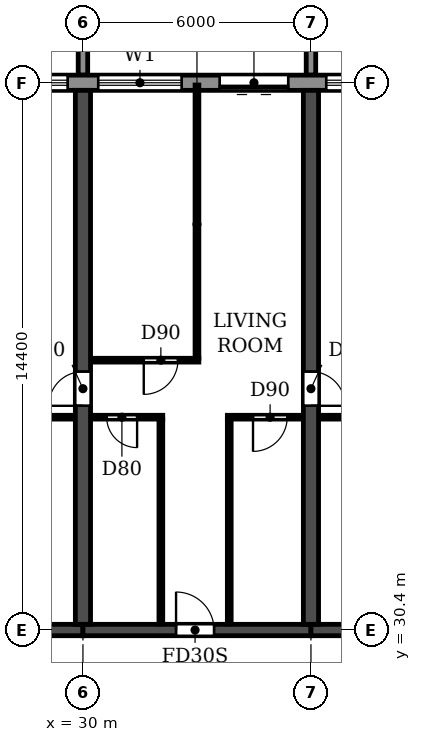
"""IFC4 building model, lengths in metres.
Left out: names, types, materials, properties, quantities, classifications, styles, units other than length and angle.
Written with IfcOpenShell. Run it as: python <this file> out.ifc"""

import sys

from ifc_helpers import new_model, si_unit, direction, frame, frame_2d, origin, place, context, subcontext, project, spatial, polyline, rectangle, outline, extrude, source, transform, mapped, element, fill, save


model = new_model("IFC4")
c1 = context("Model", 3, precision=1e-05, world=origin(), true_north=direction((0.0, 1.0)))
c2 = subcontext(c1, "Body", "Model", "MODEL_VIEW")
j1 = project(units=[si_unit("LENGTHUNIT", "METRE"), si_unit("PLANEANGLEUNIT", "RADIAN")], contexts=[c1])
p1 = place(None, origin())
s1 = spatial("IfcSite", under=j1, at=p1, CompositionType="ELEMENT")
p2 = place(p1, origin())
s2 = spatial("IfcBuilding", under=s1, at=p2, CompositionType="ELEMENT")
p3 = place(p2, frame((0.0, 0.0, 43.2)))
s3 = spatial("IfcBuildingStorey", under=s2, at=p3, CompositionType="ELEMENT", Elevation=43.2)
p4 = place(p3, frame((30.0, 30.55, 0.0), z_axis=(0.0, 0.0, 1.0), x_axis=(0.0, 1.0, 0.0)))
e1 = element("IfcWall", 1, at=p4, inside=s3, PredefinedType="SHEAR", context=c2, shape_type="SweptSolid", body=[
    extrude(rectangle(XDim=14.05, YDim=0.4, at=frame_2d((7.025, 0.0))), origin(), (0.0, 0.0, 1.0), 3.05),
])
p5 = place(p4, frame((5.75, 0.0, 0.0)))
e2 = element("IfcOpeningElement", 2, at=p5, cuts=e1, PredefinedType="OPENING", context=c2, shape_type="SweptSolid", body=[
    extrude(rectangle(XDim=0.9, YDim=2.1, at=frame_2d((0.45, 1.05))), frame((0.0, 0.21, 0.0), z_axis=(0.0, -1.0, 0.0), x_axis=(1.0, 0.0, 0.0)), (0.0, 0.0, 1.0), 0.42),
])
p6 = place(p3, frame((36.0, 30.55, 0.0), z_axis=(0.0, 0.0, 1.0), x_axis=(0.0, 1.0, 0.0)))
e3 = element("IfcWall", 3, at=p6, inside=s3, PredefinedType="SHEAR", context=c2, shape_type="SweptSolid", body=[
    extrude(rectangle(XDim=14.05, YDim=0.4, at=frame_2d((7.025, 0.0))), origin(), (0.0, 0.0, 1.0), 3.05),
])
p7 = place(p6, frame((5.75, 0.0, 0.0)))
e4 = element("IfcOpeningElement", 4, at=p7, cuts=e3, PredefinedType="OPENING", context=c2, shape_type="SweptSolid", body=[
    extrude(rectangle(XDim=0.9, YDim=2.1, at=frame_2d((0.45, 1.05))), frame((0.0, 0.21, 0.0), z_axis=(0.0, -1.0, 0.0), x_axis=(1.0, 0.0, 0.0)), (0.0, 0.0, 1.0), 0.42),
])
p8 = place(p3, frame((24.0, 30.4, 0.0), z_axis=(0.0, 0.0, 1.0), x_axis=(1.0, 0.0, 0.0)))
e5 = element("IfcWall", 5, at=p8, inside=s3, PredefinedType="SHEAR", context=c2, shape_type="SweptSolid", body=[
    extrude(rectangle(XDim=6.0, YDim=0.3, at=frame_2d((3.0, 0.0))), origin(), (0.0, 0.0, 1.0), 2.45),
])
p9 = place(p3, frame((30.0, 30.4, 0.0), z_axis=(0.0, 0.0, 1.0), x_axis=(1.0, 0.0, 0.0)))
e6 = element("IfcWall", 6, at=p9, inside=s3, PredefinedType="SHEAR", context=c2, shape_type="SweptSolid", body=[
    extrude(rectangle(XDim=6.0, YDim=0.3, at=frame_2d((3.0, 0.0))), origin(), (0.0, 0.0, 1.0), 2.45),
])
p10 = place(p9, frame((2.45, 0.0, 0.0)))
e7 = element("IfcOpeningElement", 7, at=p10, cuts=e6, PredefinedType="OPENING", context=c2, shape_type="SweptSolid", body=[
    extrude(rectangle(XDim=1.0, YDim=2.1, at=frame_2d((0.5, 1.05))), frame((0.0, 0.16, 0.0), z_axis=(0.0, -1.0, 0.0), x_axis=(1.0, 0.0, 0.0)), (0.0, 0.0, 1.0), 0.32),
])
p11 = place(p3, frame((36.0, 30.4, 0.0), z_axis=(0.0, 0.0, 1.0), x_axis=(1.0, 0.0, 0.0)))
e8 = element("IfcWall", 8, at=p11, inside=s3, PredefinedType="SHEAR", context=c2, shape_type="SweptSolid", body=[
    extrude(rectangle(XDim=6.0, YDim=0.3, at=frame_2d((3.0, 0.0))), origin(), (0.0, 0.0, 1.0), 2.45),
])
p12 = place(p3, frame((97.317, 44.8, 0.0), z_axis=(0.0, 0.0, 1.0), x_axis=(-1.0, 0.0, 0.0)))
e9 = element("IfcWall", 9, at=p12, inside=s3, PredefinedType="STANDARD", context=c2, shape_type="SweptSolid", body=[
    extrude(rectangle(XDim=92.634, YDim=0.4, at=frame_2d((46.317, 0.0))), origin(), (0.0, 0.0, 1.0), 3.05),
])
p13 = place(p12, frame((88.917, 0.0, 0.0)))
e10 = element("IfcOpeningElement", 10, at=p13, cuts=e9, PredefinedType="OPENING", context=c2, shape_type="SweptSolid", body=[
    extrude(rectangle(XDim=1.8, YDim=2.4, at=frame_2d((0.9, 1.2))), frame((0.0, 0.21, 0.0), z_axis=(0.0, -1.0, 0.0), x_axis=(1.0, 0.0, 0.0)), (0.0, 0.0, 1.0), 0.42),
])
p14 = place(p12, frame((85.717, 0.0, 0.9)))
e11 = element("IfcOpeningElement", 11, at=p14, cuts=e9, PredefinedType="OPENING", context=c2, shape_type="SweptSolid", body=[
    extrude(rectangle(XDim=2.2, YDim=1.5, at=frame_2d((1.1, 0.75))), frame((0.0, 0.21, 0.0), z_axis=(0.0, -1.0, 0.0), x_axis=(1.0, 0.0, 0.0)), (0.0, 0.0, 1.0), 0.42),
])
p15 = place(p12, frame((82.717, 0.0, 0.9)))
e12 = element("IfcOpeningElement", 12, at=p15, cuts=e9, PredefinedType="OPENING", context=c2, shape_type="SweptSolid", body=[
    extrude(rectangle(XDim=2.2, YDim=1.5, at=frame_2d((1.1, 0.75))), frame((0.0, 0.21, 0.0), z_axis=(0.0, -1.0, 0.0), x_axis=(1.0, 0.0, 0.0)), (0.0, 0.0, 1.0), 0.42),
])
p16 = place(p12, frame((79.717, 0.0, 0.9)))
e13 = element("IfcOpeningElement", 13, at=p16, cuts=e9, PredefinedType="OPENING", context=c2, shape_type="SweptSolid", body=[
    extrude(rectangle(XDim=2.2, YDim=1.5, at=frame_2d((1.1, 0.75))), frame((0.0, 0.21, 0.0), z_axis=(0.0, -1.0, 0.0), x_axis=(1.0, 0.0, 0.0)), (0.0, 0.0, 1.0), 0.42),
])
p17 = place(p12, frame((76.717, 0.0, 0.9)))
e14 = element("IfcOpeningElement", 14, at=p17, cuts=e9, PredefinedType="OPENING", context=c2, shape_type="SweptSolid", body=[
    extrude(rectangle(XDim=2.2, YDim=1.5, at=frame_2d((1.1, 0.75))), frame((0.0, 0.21, 0.0), z_axis=(0.0, -1.0, 0.0), x_axis=(1.0, 0.0, 0.0)), (0.0, 0.0, 1.0), 0.42),
])
p18 = place(p12, frame((73.917, 0.0, 0.0)))
e15 = element("IfcOpeningElement", 15, at=p18, cuts=e9, PredefinedType="OPENING", context=c2, shape_type="SweptSolid", body=[
    extrude(rectangle(XDim=1.8, YDim=2.4, at=frame_2d((0.9, 1.2))), frame((0.0, 0.21, 0.0), z_axis=(0.0, -1.0, 0.0), x_axis=(1.0, 0.0, 0.0)), (0.0, 0.0, 1.0), 0.42),
])
p19 = place(p12, frame((70.717, 0.0, 0.9)))
e16 = element("IfcOpeningElement", 16, at=p19, cuts=e9, PredefinedType="OPENING", context=c2, shape_type="SweptSolid", body=[
    extrude(rectangle(XDim=2.2, YDim=1.5, at=frame_2d((1.1, 0.75))), frame((0.0, 0.21, 0.0), z_axis=(0.0, -1.0, 0.0), x_axis=(1.0, 0.0, 0.0)), (0.0, 0.0, 1.0), 0.42),
])
p20 = place(p12, frame((67.717, 0.0, 0.9)))
e17 = element("IfcOpeningElement", 17, at=p20, cuts=e9, PredefinedType="OPENING", context=c2, shape_type="SweptSolid", body=[
    extrude(rectangle(XDim=2.2, YDim=1.5, at=frame_2d((1.1, 0.75))), frame((0.0, 0.21, 0.0), z_axis=(0.0, -1.0, 0.0), x_axis=(1.0, 0.0, 0.0)), (0.0, 0.0, 1.0), 0.42),
])
p21 = place(p12, frame((64.717, 0.0, 0.9)))
e18 = element("IfcOpeningElement", 18, at=p21, cuts=e9, PredefinedType="OPENING", context=c2, shape_type="SweptSolid", body=[
    extrude(rectangle(XDim=2.2, YDim=1.5, at=frame_2d((1.1, 0.75))), frame((0.0, 0.21, 0.0), z_axis=(0.0, -1.0, 0.0), x_axis=(1.0, 0.0, 0.0)), (0.0, 0.0, 1.0), 0.42),
])
p22 = place(p12, frame((61.917, 0.0, 0.0)))
e19 = element("IfcOpeningElement", 19, at=p22, cuts=e9, PredefinedType="OPENING", context=c2, shape_type="SweptSolid", body=[
    extrude(rectangle(XDim=1.8, YDim=2.4, at=frame_2d((0.9, 1.2))), frame((0.0, 0.21, 0.0), z_axis=(0.0, -1.0, 0.0), x_axis=(1.0, 0.0, 0.0)), (0.0, 0.0, 1.0), 0.42),
])
p23 = place(p12, frame((58.717, 0.0, 0.9)))
e20 = element("IfcOpeningElement", 20, at=p23, cuts=e9, PredefinedType="OPENING", context=c2, shape_type="SweptSolid", body=[
    extrude(rectangle(XDim=2.2, YDim=1.5, at=frame_2d((1.1, 0.75))), frame((0.0, 0.21, 0.0), z_axis=(0.0, -1.0, 0.0), x_axis=(1.0, 0.0, 0.0)), (0.0, 0.0, 1.0), 0.42),
])
p24 = place(p12, frame((55.717, 0.0, 0.9)))
e21 = element("IfcOpeningElement", 21, at=p24, cuts=e9, PredefinedType="OPENING", context=c2, shape_type="SweptSolid", body=[
    extrude(rectangle(XDim=2.2, YDim=1.5, at=frame_2d((1.1, 0.75))), frame((0.0, 0.21, 0.0), z_axis=(0.0, -1.0, 0.0), x_axis=(1.0, 0.0, 0.0)), (0.0, 0.0, 1.0), 0.42),
])
p25 = place(p12, frame((52.717, 0.0, 0.9)))
e22 = element("IfcOpeningElement", 22, at=p25, cuts=e9, PredefinedType="OPENING", context=c2, shape_type="SweptSolid", body=[
    extrude(rectangle(XDim=2.2, YDim=1.5, at=frame_2d((1.1, 0.75))), frame((0.0, 0.21, 0.0), z_axis=(0.0, -1.0, 0.0), x_axis=(1.0, 0.0, 0.0)), (0.0, 0.0, 1.0), 0.42),
])
p26 = place(p12, frame((49.917, 0.0, 0.0)))
e23 = element("IfcOpeningElement", 23, at=p26, cuts=e9, PredefinedType="OPENING", context=c2, shape_type="SweptSolid", body=[
    extrude(rectangle(XDim=1.8, YDim=2.4, at=frame_2d((0.9, 1.2))), frame((0.0, 0.21, 0.0), z_axis=(0.0, -1.0, 0.0), x_axis=(1.0, 0.0, 0.0)), (0.0, 0.0, 1.0), 0.42),
])
p27 = place(p12, frame((46.717, 0.0, 0.9)))
e24 = element("IfcOpeningElement", 24, at=p27, cuts=e9, PredefinedType="OPENING", context=c2, shape_type="SweptSolid", body=[
    extrude(rectangle(XDim=2.2, YDim=1.5, at=frame_2d((1.1, 0.75))), frame((0.0, 0.21, 0.0), z_axis=(0.0, -1.0, 0.0), x_axis=(1.0, 0.0, 0.0)), (0.0, 0.0, 1.0), 0.42),
])
p28 = place(p12, frame((43.717, 0.0, 0.9)))
e25 = element("IfcOpeningElement", 25, at=p28, cuts=e9, PredefinedType="OPENING", context=c2, shape_type="SweptSolid", body=[
    extrude(rectangle(XDim=2.2, YDim=1.5, at=frame_2d((1.1, 0.75))), frame((0.0, 0.21, 0.0), z_axis=(0.0, -1.0, 0.0), x_axis=(1.0, 0.0, 0.0)), (0.0, 0.0, 1.0), 0.42),
])
p29 = place(p12, frame((40.717, 0.0, 0.9)))
e26 = element("IfcOpeningElement", 26, at=p29, cuts=e9, PredefinedType="OPENING", context=c2, shape_type="SweptSolid", body=[
    extrude(rectangle(XDim=2.2, YDim=1.5, at=frame_2d((1.1, 0.75))), frame((0.0, 0.21, 0.0), z_axis=(0.0, -1.0, 0.0), x_axis=(1.0, 0.0, 0.0)), (0.0, 0.0, 1.0), 0.42),
])
p30 = place(p12, frame((37.917, 0.0, 0.0)))
e27 = element("IfcOpeningElement", 27, at=p30, cuts=e9, PredefinedType="OPENING", context=c2, shape_type="SweptSolid", body=[
    extrude(rectangle(XDim=1.8, YDim=2.4, at=frame_2d((0.9, 1.2))), frame((0.0, 0.21, 0.0), z_axis=(0.0, -1.0, 0.0), x_axis=(1.0, 0.0, 0.0)), (0.0, 0.0, 1.0), 0.42),
])
p31 = place(p12, frame((34.717, 0.0, 0.9)))
e28 = element("IfcOpeningElement", 28, at=p31, cuts=e9, PredefinedType="OPENING", context=c2, shape_type="SweptSolid", body=[
    extrude(rectangle(XDim=2.2, YDim=1.5, at=frame_2d((1.1, 0.75))), frame((0.0, 0.21, 0.0), z_axis=(0.0, -1.0, 0.0), x_axis=(1.0, 0.0, 0.0)), (0.0, 0.0, 1.0), 0.42),
])
p32 = place(p12, frame((31.717, 0.0, 0.9)))
e29 = element("IfcOpeningElement", 29, at=p32, cuts=e9, PredefinedType="OPENING", context=c2, shape_type="SweptSolid", body=[
    extrude(rectangle(XDim=2.2, YDim=1.5, at=frame_2d((1.1, 0.75))), frame((0.0, 0.21, 0.0), z_axis=(0.0, -1.0, 0.0), x_axis=(1.0, 0.0, 0.0)), (0.0, 0.0, 1.0), 0.42),
])
p33 = place(p12, frame((28.717, 0.0, 0.9)))
e30 = element("IfcOpeningElement", 30, at=p33, cuts=e9, PredefinedType="OPENING", context=c2, shape_type="SweptSolid", body=[
    extrude(rectangle(XDim=2.2, YDim=1.5, at=frame_2d((1.1, 0.75))), frame((0.0, 0.21, 0.0), z_axis=(0.0, -1.0, 0.0), x_axis=(1.0, 0.0, 0.0)), (0.0, 0.0, 1.0), 0.42),
])
p34 = place(p12, frame((25.917, 0.0, 0.0)))
e31 = element("IfcOpeningElement", 31, at=p34, cuts=e9, PredefinedType="OPENING", context=c2, shape_type="SweptSolid", body=[
    extrude(rectangle(XDim=1.8, YDim=2.4, at=frame_2d((0.9, 1.2))), frame((0.0, 0.21, 0.0), z_axis=(0.0, -1.0, 0.0), x_axis=(1.0, 0.0, 0.0)), (0.0, 0.0, 1.0), 0.42),
])
p35 = place(p12, frame((22.917, 0.0, 0.0)))
e32 = element("IfcOpeningElement", 32, at=p35, cuts=e9, PredefinedType="OPENING", context=c2, shape_type="SweptSolid", body=[
    extrude(rectangle(XDim=1.8, YDim=2.4, at=frame_2d((0.9, 1.2))), frame((0.0, 0.21, 0.0), z_axis=(0.0, -1.0, 0.0), x_axis=(1.0, 0.0, 0.0)), (0.0, 0.0, 1.0), 0.42),
])
p36 = place(p12, frame((19.717, 0.0, 0.9)))
e33 = element("IfcOpeningElement", 33, at=p36, cuts=e9, PredefinedType="OPENING", context=c2, shape_type="SweptSolid", body=[
    extrude(rectangle(XDim=2.2, YDim=1.5, at=frame_2d((1.1, 0.75))), frame((0.0, 0.21, 0.0), z_axis=(0.0, -1.0, 0.0), x_axis=(1.0, 0.0, 0.0)), (0.0, 0.0, 1.0), 0.42),
])
p37 = place(p12, frame((16.717, 0.0, 0.9)))
e34 = element("IfcOpeningElement", 34, at=p37, cuts=e9, PredefinedType="OPENING", context=c2, shape_type="SweptSolid", body=[
    extrude(rectangle(XDim=2.2, YDim=1.5, at=frame_2d((1.1, 0.75))), frame((0.0, 0.21, 0.0), z_axis=(0.0, -1.0, 0.0), x_axis=(1.0, 0.0, 0.0)), (0.0, 0.0, 1.0), 0.42),
])
p38 = place(p12, frame((13.717, 0.0, 0.9)))
e35 = element("IfcOpeningElement", 35, at=p38, cuts=e9, PredefinedType="OPENING", context=c2, shape_type="SweptSolid", body=[
    extrude(rectangle(XDim=2.2, YDim=1.5, at=frame_2d((1.1, 0.75))), frame((0.0, 0.21, 0.0), z_axis=(0.0, -1.0, 0.0), x_axis=(1.0, 0.0, 0.0)), (0.0, 0.0, 1.0), 0.42),
])
p39 = place(p12, frame((10.717, 0.0, 0.9)))
e36 = element("IfcOpeningElement", 36, at=p39, cuts=e9, PredefinedType="OPENING", context=c2, shape_type="SweptSolid", body=[
    extrude(rectangle(XDim=2.2, YDim=1.5, at=frame_2d((1.1, 0.75))), frame((0.0, 0.21, 0.0), z_axis=(0.0, -1.0, 0.0), x_axis=(1.0, 0.0, 0.0)), (0.0, 0.0, 1.0), 0.42),
])
p40 = place(p12, frame((7.917, 0.0, 0.0)))
e37 = element("IfcOpeningElement", 37, at=p40, cuts=e9, PredefinedType="OPENING", context=c2, shape_type="SweptSolid", body=[
    extrude(rectangle(XDim=1.8, YDim=2.4, at=frame_2d((0.9, 1.2))), frame((0.0, 0.21, 0.0), z_axis=(0.0, -1.0, 0.0), x_axis=(1.0, 0.0, 0.0)), (0.0, 0.0, 1.0), 0.42),
])
p41 = place(p12, frame((4.717, 0.0, 0.9)))
e38 = element("IfcOpeningElement", 38, at=p41, cuts=e9, PredefinedType="OPENING", context=c2, shape_type="SweptSolid", body=[
    extrude(rectangle(XDim=2.2, YDim=1.5, at=frame_2d((1.1, 0.75))), frame((0.0, 0.21, 0.0), z_axis=(0.0, -1.0, 0.0), x_axis=(1.0, 0.0, 0.0)), (0.0, 0.0, 1.0), 0.42),
])
p42 = place(p12, frame((1.917, 0.0, 0.0)))
e39 = element("IfcOpeningElement", 39, at=p42, cuts=e9, PredefinedType="OPENING", context=c2, shape_type="SweptSolid", body=[
    extrude(rectangle(XDim=1.8, YDim=2.4, at=frame_2d((0.9, 1.2))), frame((0.0, 0.21, 0.0), z_axis=(0.0, -1.0, 0.0), x_axis=(1.0, 0.0, 0.0)), (0.0, 0.0, 1.0), 0.42),
])
m1 = source(origin(), c2, "Body", "SweptSolid", [
    extrude(outline(polyline([(0.0, 0.0), (0.25, 0.0), (0.25, 3.1), (0.0, 3.1), (0.0, 0.0)])), origin(), (0.0, 0.0, 1.0), 3.1),
])
for number, where in (
    (40, (29.875, 45.0, 0.0)),
    (41, (35.875, 45.0, 0.0)),
):
    element("IfcWall", number, at=place(p3, frame(where)), inside=s3, PredefinedType="STANDARD", context=c2, shape_type="MappedRepresentation", body=[
        mapped(m1, transform((0.0, 0.0, 0.0))),
    ])
p43 = place(p3, frame((27.1, 36.0, 0.0), z_axis=(0.0, 0.0, 1.0), x_axis=(1.0, 0.0, 0.0)))
e42 = element("IfcWall", 42, at=p43, inside=s3, PredefinedType="PARTITIONING", context=c2, shape_type="SweptSolid", body=[
    extrude(rectangle(XDim=2.69, YDim=0.1, at=frame_2d((1.345, 0.0))), origin(), (0.0, 0.0, 1.0), 3.05),
])
p44 = place(p43, frame((1.0, 0.0, 0.0)))
e43 = element("IfcOpeningElement", 43, at=p44, cuts=e42, PredefinedType="OPENING", context=c2, shape_type="SweptSolid", body=[
    extrude(rectangle(XDim=0.8, YDim=2.1, at=frame_2d((0.4, 1.05))), frame((0.0, 0.06, 0.0), z_axis=(0.0, -1.0, 0.0), x_axis=(1.0, 0.0, 0.0)), (0.0, 0.0, 1.0), 0.12),
])
p45 = place(p3, frame((30.21, 36.0, 0.0), z_axis=(0.0, 0.0, 1.0), x_axis=(1.0, 0.0, 0.0)))
e44 = element("IfcWall", 44, at=p45, inside=s3, PredefinedType="PARTITIONING", context=c2, shape_type="SweptSolid", body=[
    extrude(rectangle(XDim=1.89, YDim=0.1, at=frame_2d((0.945, 0.0))), origin(), (0.0, 0.0, 1.0), 3.05),
])
p46 = place(p45, frame((0.415, 0.0, 0.0)))
e45 = element("IfcOpeningElement", 45, at=p46, cuts=e44, PredefinedType="OPENING", context=c2, shape_type="SweptSolid", body=[
    extrude(rectangle(XDim=0.8, YDim=2.1, at=frame_2d((0.4, 1.05))), frame((0.0, 0.06, 0.0), z_axis=(0.0, -1.0, 0.0), x_axis=(1.0, 0.0, 0.0)), (0.0, 0.0, 1.0), 0.12),
])
p47 = place(p3, frame((33.8, 36.0, 0.0), z_axis=(0.0, 0.0, 1.0), x_axis=(1.0, 0.0, 0.0)))
e46 = element("IfcWall", 46, at=p47, inside=s3, PredefinedType="PARTITIONING", context=c2, shape_type="SweptSolid", body=[
    extrude(rectangle(XDim=1.99, YDim=0.1, at=frame_2d((0.995, 0.0))), origin(), (0.0, 0.0, 1.0), 3.05),
])
p48 = place(p47, frame((0.675, 0.0, 0.0)))
e47 = element("IfcOpeningElement", 47, at=p48, cuts=e46, PredefinedType="OPENING", context=c2, shape_type="SweptSolid", body=[
    extrude(rectangle(XDim=0.9, YDim=2.1, at=frame_2d((0.45, 1.05))), frame((0.0, 0.06, 0.0), z_axis=(0.0, -1.0, 0.0), x_axis=(1.0, 0.0, 0.0)), (0.0, 0.0, 1.0), 0.12),
])
p49 = place(p3, frame((36.21, 36.0, 0.0), z_axis=(0.0, 0.0, 1.0), x_axis=(1.0, 0.0, 0.0)))
e48 = element("IfcWall", 48, at=p49, inside=s3, PredefinedType="PARTITIONING", context=c2, shape_type="SweptSolid", body=[
    extrude(rectangle(XDim=2.69, YDim=0.1, at=frame_2d((1.345, 0.0))), origin(), (0.0, 0.0, 1.0), 3.05),
])
p50 = place(p49, frame((0.89, 0.0, 0.0)))
e49 = element("IfcOpeningElement", 49, at=p50, cuts=e48, PredefinedType="OPENING", context=c2, shape_type="SweptSolid", body=[
    extrude(rectangle(XDim=0.8, YDim=2.1, at=frame_2d((0.4, 1.05))), frame((0.0, 0.06, 0.0), z_axis=(0.0, -1.0, 0.0), x_axis=(1.0, 0.0, 0.0)), (0.0, 0.0, 1.0), 0.12),
])
p51 = place(p3, frame((30.21, 37.5, 0.0), z_axis=(0.0, 0.0, 1.0), x_axis=(1.0, 0.0, 0.0)))
e50 = element("IfcWall", 50, at=p51, inside=s3, PredefinedType="PARTITIONING", context=c2, shape_type="SweptSolid", body=[
    extrude(rectangle(XDim=2.84, YDim=0.1, at=frame_2d((1.42, 0.0))), origin(), (0.0, 0.0, 1.0), 3.05),
])
p52 = place(p51, frame((1.39, 0.0, 0.0)))
e51 = element("IfcOpeningElement", 51, at=p52, cuts=e50, PredefinedType="OPENING", context=c2, shape_type="SweptSolid", body=[
    extrude(rectangle(XDim=0.9, YDim=2.1, at=frame_2d((0.45, 1.05))), frame((0.0, 0.06, 0.0), z_axis=(0.0, -1.0, 0.0), x_axis=(1.0, 0.0, 0.0)), (0.0, 0.0, 1.0), 0.12),
])
p53 = place(p3, frame((32.05, 30.56, 0.0), z_axis=(0.0, 0.0, 1.0), x_axis=(0.0, 1.0, 0.0)))
e52 = element("IfcWall", 52, at=p53, inside=s3, PredefinedType="PARTITIONING", context=c2, shape_type="SweptSolid", body=[
    extrude(rectangle(XDim=5.39, YDim=0.1, at=frame_2d((2.695, 0.0))), origin(), (0.0, 0.0, 1.0), 3.05),
])
p54 = place(p3, frame((33.0, 37.55, 0.0), z_axis=(0.0, 0.0, 1.0), x_axis=(0.0, 1.0, 0.0)))
e53 = element("IfcWall", 53, at=p54, inside=s3, PredefinedType="PARTITIONING", context=c2, shape_type="SweptSolid", body=[
    extrude(rectangle(XDim=7.19, YDim=0.1, at=frame_2d((3.595, 0.0))), origin(), (0.0, 0.0, 1.0), 3.05),
])
p55 = place(p3, frame((33.85, 30.56, 0.0), z_axis=(0.0, 0.0, 1.0), x_axis=(0.0, 1.0, 0.0)))
e54 = element("IfcWall", 54, at=p55, inside=s3, PredefinedType="PARTITIONING", context=c2, shape_type="SweptSolid", body=[
    extrude(rectangle(XDim=5.39, YDim=0.1, at=frame_2d((2.695, 0.0))), origin(), (0.0, 0.0, 1.0), 3.05),
])
p56 = place(p20, origin())
e55 = element("IfcWindow", 55, at=p56, inside=s3, PartitioningType="DOUBLE_PANEL_HORIZONTAL", PredefinedType="WINDOW", context=c2, shape_type="SweptSolid", body=[
    extrude(rectangle(XDim=2.2, YDim=1.5, at=frame_2d((1.1, 0.75))), frame((0.0, 0.03, 0.0), z_axis=(0.0, -1.0, 0.0), x_axis=(1.0, 0.0, 0.0)), (0.0, 0.0, 1.0), 0.06),
])
fill(e17, e55)
p57 = place(p21, origin())
e56 = element("IfcWindow", 56, at=p57, inside=s3, PartitioningType="DOUBLE_PANEL_HORIZONTAL", PredefinedType="WINDOW", context=c2, shape_type="SweptSolid", body=[
    extrude(rectangle(XDim=2.2, YDim=1.5, at=frame_2d((1.1, 0.75))), frame((0.0, 0.03, 0.0), z_axis=(0.0, -1.0, 0.0), x_axis=(1.0, 0.0, 0.0)), (0.0, 0.0, 1.0), 0.06),
])
fill(e18, e56)
p58 = place(p22, origin())
e57 = element("IfcDoor", 57, at=p58, inside=s3, OperationType="DOUBLE_DOOR_SLIDING", PredefinedType="DOOR", context=c2, shape_type="SweptSolid", body=[
    extrude(rectangle(XDim=1.8, YDim=2.4, at=frame_2d((0.9, 1.2))), frame((0.0, 0.025, 0.0), z_axis=(0.0, -1.0, 0.0), x_axis=(1.0, 0.0, 0.0)), (0.0, 0.0, 1.0), 0.05),
])
fill(e19, e57)
p59 = place(p23, origin())
e58 = element("IfcWindow", 58, at=p59, inside=s3, PartitioningType="DOUBLE_PANEL_HORIZONTAL", PredefinedType="WINDOW", context=c2, shape_type="SweptSolid", body=[
    extrude(rectangle(XDim=2.2, YDim=1.5, at=frame_2d((1.1, 0.75))), frame((0.0, 0.03, 0.0), z_axis=(0.0, -1.0, 0.0), x_axis=(1.0, 0.0, 0.0)), (0.0, 0.0, 1.0), 0.06),
])
fill(e20, e58)
p60 = place(p5, origin())
e59 = element("IfcDoor", 59, at=p60, inside=s3, OperationType="SINGLE_SWING_LEFT", PredefinedType="DOOR", context=c2, shape_type="SweptSolid", body=[
    extrude(rectangle(XDim=0.9, YDim=2.1, at=frame_2d((0.45, 1.05))), frame((0.0, 0.025, 0.0), z_axis=(0.0, -1.0, 0.0), x_axis=(1.0, 0.0, 0.0)), (0.0, 0.0, 1.0), 0.05),
])
fill(e2, e59)
p61 = place(p46, frame((0.8, 0.0, 0.0), z_axis=(0.0, 0.0, 1.0), x_axis=(-1.0, 0.0, 0.0)))
e60 = element("IfcDoor", 60, at=p61, inside=s3, OperationType="SINGLE_SWING_LEFT", PredefinedType="DOOR", context=c2, shape_type="SweptSolid", body=[
    extrude(rectangle(XDim=0.8, YDim=2.1, at=frame_2d((0.4, 1.05))), frame((0.0, 0.025, 0.0), z_axis=(0.0, -1.0, 0.0), x_axis=(1.0, 0.0, 0.0)), (0.0, 0.0, 1.0), 0.05),
])
fill(e45, e60)
p62 = place(p52, frame((0.9, 0.0, 0.0), z_axis=(0.0, 0.0, 1.0), x_axis=(-1.0, 0.0, 0.0)))
e61 = element("IfcDoor", 61, at=p62, inside=s3, OperationType="SINGLE_SWING_RIGHT", PredefinedType="DOOR", context=c2, shape_type="SweptSolid", body=[
    extrude(rectangle(XDim=0.9, YDim=2.1, at=frame_2d((0.45, 1.05))), frame((0.0, 0.025, 0.0), z_axis=(0.0, -1.0, 0.0), x_axis=(1.0, 0.0, 0.0)), (0.0, 0.0, 1.0), 0.05),
])
fill(e51, e61)
p63 = place(p10, origin())
e62 = element("IfcDoor", 62, at=p63, inside=s3, OperationType="SINGLE_SWING_LEFT", PredefinedType="DOOR", context=c2, shape_type="SweptSolid", body=[
    extrude(rectangle(XDim=1.0, YDim=2.1, at=frame_2d((0.5, 1.05))), frame((0.0, 0.025, 0.0), z_axis=(0.0, -1.0, 0.0), x_axis=(1.0, 0.0, 0.0)), (0.0, 0.0, 1.0), 0.05),
])
fill(e7, e62)
p64 = place(p48, frame((0.9, 0.0, 0.0), z_axis=(0.0, 0.0, 1.0), x_axis=(-1.0, 0.0, 0.0)))
e63 = element("IfcDoor", 63, at=p64, inside=s3, OperationType="SINGLE_SWING_RIGHT", PredefinedType="DOOR", context=c2, shape_type="SweptSolid", body=[
    extrude(rectangle(XDim=0.9, YDim=2.1, at=frame_2d((0.45, 1.05))), frame((0.0, 0.025, 0.0), z_axis=(0.0, -1.0, 0.0), x_axis=(1.0, 0.0, 0.0)), (0.0, 0.0, 1.0), 0.05),
])
fill(e47, e63)
p65 = place(p7, frame((0.9, 0.0, 0.0), z_axis=(0.0, 0.0, 1.0), x_axis=(-1.0, 0.0, 0.0)))
e64 = element("IfcDoor", 64, at=p65, inside=s3, OperationType="SINGLE_SWING_RIGHT", PredefinedType="DOOR", context=c2, shape_type="SweptSolid", body=[
    extrude(rectangle(XDim=0.9, YDim=2.1, at=frame_2d((0.45, 1.05))), frame((0.0, 0.025, 0.0), z_axis=(0.0, -1.0, 0.0), x_axis=(1.0, 0.0, 0.0)), (0.0, 0.0, 1.0), 0.05),
])
fill(e4, e64)
save(model, sys.argv[1])
